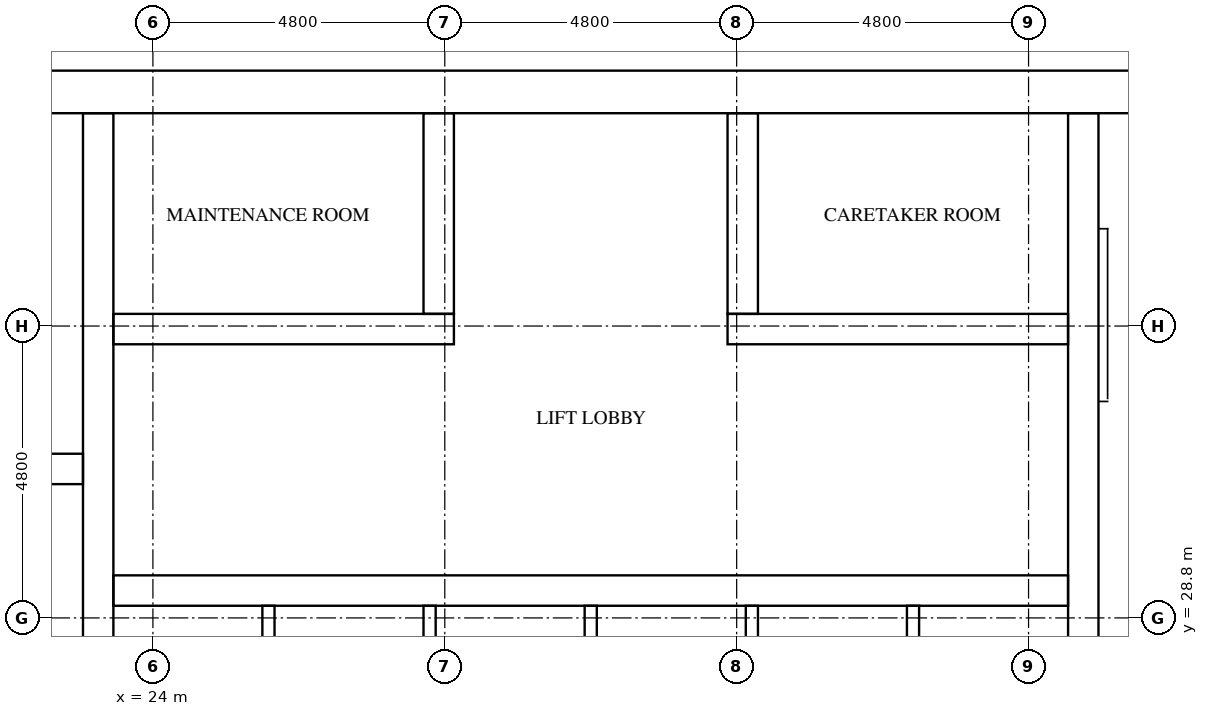
"""IFC4 building model, lengths in metres.
Left out: names, types, materials, properties, quantities, classifications, styles, units other than length and angle.
Written with IfcOpenShell. Run it as: python <this file> out.ifc"""

import sys

from ifc_helpers import new_model, si_unit, direction, frame, frame_2d, origin, place, context, subcontext, project, spatial, rectangle, extrude, element, fill, save


model = new_model("IFC4")
c1 = context("Model", 3, precision=1e-05, world=origin(), true_north=direction((0.0, 1.0)))
c2 = subcontext(c1, "Body", "Model", "MODEL_VIEW")
j1 = project(units=[si_unit("LENGTHUNIT", "METRE"), si_unit("PLANEANGLEUNIT", "RADIAN")], contexts=[c1])
p1 = place(None, origin())
s1 = spatial("IfcSite", under=j1, at=p1, CompositionType="ELEMENT")
p2 = place(p1, origin())
s2 = spatial("IfcBuilding", under=s1, at=p2, CompositionType="ELEMENT")
p3 = place(p2, frame((0.0, 0.0, 208.8)))
s3 = spatial("IfcBuildingStorey", under=s2, at=p3, CompositionType="ELEMENT", Elevation=208.8)
p4 = place(p3, frame((15.0, 37.45, 0.0), z_axis=(0.0, 0.0, 1.0), x_axis=(1.0, 0.0, 0.0)))
e1 = element("IfcWall", 1, at=p4, inside=s3, PredefinedType="SHEAR", context=c2, shape_type="SweptSolid", body=[
    extrude(rectangle(XDim=32.4, YDim=0.7, at=frame_2d((16.2, 0.0))), origin(), (0.0, 0.0, 1.0), 3.2),
])
p5 = place(p4, frame((15.3, 0.0, 0.0)))
e2 = element("IfcOpeningElement", 2, at=p5, cuts=e1, PredefinedType="OPENING", context=c2, shape_type="SweptSolid", body=[
    extrude(rectangle(XDim=1.8, YDim=2.1, at=frame_2d((0.9, 1.05))), frame((0.0, 0.36, 0.0), z_axis=(0.0, -1.0, 0.0), x_axis=(1.0, 0.0, 0.0)), (0.0, 0.0, 1.0), 0.72),
])
p6 = place(p4, frame((1.544, 0.0, 0.0)))
e3 = element("IfcOpeningElement", 3, at=p6, cuts=e1, PredefinedType="OPENING", context=c2, shape_type="SweptSolid", body=[
    extrude(rectangle(XDim=1.0, YDim=2.1, at=frame_2d((0.5, 1.05))), frame((0.0, 0.36, 0.0), z_axis=(0.0, -1.0, 0.0), x_axis=(1.0, 0.0, 0.0)), (0.0, 0.0, 1.0), 0.72),
])
p7 = place(p4, frame((5.219, 0.0, 0.0)))
e4 = element("IfcOpeningElement", 4, at=p7, cuts=e1, PredefinedType="OPENING", context=c2, shape_type="SweptSolid", body=[
    extrude(rectangle(XDim=1.0, YDim=2.1, at=frame_2d((0.5, 1.05))), frame((0.0, 0.36, 0.0), z_axis=(0.0, -1.0, 0.0), x_axis=(1.0, 0.0, 0.0)), (0.0, 0.0, 1.0), 0.72),
])
p8 = place(p3, frame((23.1, 15.7, 0.0), z_axis=(0.0, 0.0, 1.0), x_axis=(0.0, 1.0, 0.0)))
e5 = element("IfcWall", 5, at=p8, inside=s3, PredefinedType="SHEAR", context=c2, shape_type="SweptSolid", body=[
    extrude(rectangle(XDim=21.4, YDim=0.5, at=frame_2d((10.7, 0.0))), origin(), (0.0, 0.0, 1.0), 3.2),
])
p9 = place(p3, frame((39.3, 27.75, 0.0), z_axis=(0.0, 0.0, 1.0), x_axis=(0.0, 1.0, 0.0)))
e6 = element("IfcWall", 6, at=p9, inside=s3, PredefinedType="SHEAR", context=c2, shape_type="SweptSolid", body=[
    extrude(rectangle(XDim=9.35, YDim=0.5, at=frame_2d((4.675, 0.0))), origin(), (0.0, 0.0, 1.0), 3.2),
])
p10 = place(p3, frame((15.7, 31.25, 0.0), z_axis=(0.0, 0.0, 1.0), x_axis=(1.0, 0.0, 0.0)))
e7 = element("IfcWall", 7, at=p10, inside=s3, PredefinedType="SHEAR", context=c2, shape_type="SweptSolid", body=[
    extrude(rectangle(XDim=7.15, YDim=0.5, at=frame_2d((3.575, 0.0))), origin(), (0.0, 0.0, 1.0), 3.2),
])
p11 = place(p3, frame((23.35, 29.25, 0.0), z_axis=(0.0, 0.0, 1.0), x_axis=(1.0, 0.0, 0.0)))
e8 = element("IfcWall", 8, at=p11, inside=s3, PredefinedType="SHEAR", context=c2, shape_type="SweptSolid", body=[
    extrude(rectangle(XDim=15.7, YDim=0.5, at=frame_2d((7.85, 0.0))), origin(), (0.0, 0.0, 1.0), 3.2),
])
p12 = place(p11, frame((0.675, 0.0, 0.0)))
e9 = element("IfcOpeningElement", 9, at=p12, cuts=e8, PredefinedType="OPENING", context=c2, shape_type="SweptSolid", body=[
    extrude(rectangle(XDim=1.1, YDim=2.1, at=frame_2d((0.55, 1.05))), frame((0.0, 0.26, 0.0), z_axis=(0.0, -1.0, 0.0), x_axis=(1.0, 0.0, 0.0)), (0.0, 0.0, 1.0), 0.52),
])
p13 = place(p11, frame((3.325, 0.0, 0.0)))
e10 = element("IfcOpeningElement", 10, at=p13, cuts=e8, PredefinedType="OPENING", context=c2, shape_type="SweptSolid", body=[
    extrude(rectangle(XDim=1.1, YDim=2.1, at=frame_2d((0.55, 1.05))), frame((0.0, 0.26, 0.0), z_axis=(0.0, -1.0, 0.0), x_axis=(1.0, 0.0, 0.0)), (0.0, 0.0, 1.0), 0.52),
])
p14 = place(p11, frame((5.975, 0.0, 0.0)))
e11 = element("IfcOpeningElement", 11, at=p14, cuts=e8, PredefinedType="OPENING", context=c2, shape_type="SweptSolid", body=[
    extrude(rectangle(XDim=1.1, YDim=2.1, at=frame_2d((0.55, 1.05))), frame((0.0, 0.26, 0.0), z_axis=(0.0, -1.0, 0.0), x_axis=(1.0, 0.0, 0.0)), (0.0, 0.0, 1.0), 0.52),
])
p15 = place(p11, frame((8.625, 0.0, 0.0)))
e12 = element("IfcOpeningElement", 12, at=p15, cuts=e8, PredefinedType="OPENING", context=c2, shape_type="SweptSolid", body=[
    extrude(rectangle(XDim=1.1, YDim=2.1, at=frame_2d((0.55, 1.05))), frame((0.0, 0.26, 0.0), z_axis=(0.0, -1.0, 0.0), x_axis=(1.0, 0.0, 0.0)), (0.0, 0.0, 1.0), 0.52),
])
p16 = place(p11, frame((11.275, 0.0, 0.0)))
e13 = element("IfcOpeningElement", 13, at=p16, cuts=e8, PredefinedType="OPENING", context=c2, shape_type="SweptSolid", body=[
    extrude(rectangle(XDim=1.1, YDim=2.1, at=frame_2d((0.55, 1.05))), frame((0.0, 0.26, 0.0), z_axis=(0.0, -1.0, 0.0), x_axis=(1.0, 0.0, 0.0)), (0.0, 0.0, 1.0), 0.52),
])
p17 = place(p11, frame((13.925, 0.0, 0.0)))
e14 = element("IfcOpeningElement", 14, at=p17, cuts=e8, PredefinedType="OPENING", context=c2, shape_type="SweptSolid", body=[
    extrude(rectangle(XDim=1.1, YDim=2.1, at=frame_2d((0.55, 1.05))), frame((0.0, 0.26, 0.0), z_axis=(0.0, -1.0, 0.0), x_axis=(1.0, 0.0, 0.0)), (0.0, 0.0, 1.0), 0.52),
])
p18 = place(p3, frame((23.35, 33.55, 0.0), z_axis=(0.0, 0.0, 1.0), x_axis=(1.0, 0.0, 0.0)))
e15 = element("IfcWall", 15, at=p18, inside=s3, PredefinedType="SHEAR", context=c2, shape_type="SweptSolid", body=[
    extrude(rectangle(XDim=5.6, YDim=0.5, at=frame_2d((2.8, 0.0))), origin(), (0.0, 0.0, 1.0), 3.2),
])
p19 = place(p18, frame((2.05, 0.0, 0.0)))
e16 = element("IfcOpeningElement", 16, at=p19, cuts=e15, PredefinedType="OPENING", context=c2, shape_type="SweptSolid", body=[
    extrude(rectangle(XDim=1.0, YDim=2.1, at=frame_2d((0.5, 1.05))), frame((0.0, 0.26, 0.0), z_axis=(0.0, -1.0, 0.0), x_axis=(1.0, 0.0, 0.0)), (0.0, 0.0, 1.0), 0.52),
])
p20 = place(p3, frame((33.45, 33.55, 0.0), z_axis=(0.0, 0.0, 1.0), x_axis=(1.0, 0.0, 0.0)))
e17 = element("IfcWall", 17, at=p20, inside=s3, PredefinedType="SHEAR", context=c2, shape_type="SweptSolid", body=[
    extrude(rectangle(XDim=5.6, YDim=0.5, at=frame_2d((2.8, 0.0))), origin(), (0.0, 0.0, 1.0), 3.2),
])
p21 = place(p20, frame((2.55, 0.0, 0.0)))
e18 = element("IfcOpeningElement", 18, at=p21, cuts=e17, PredefinedType="OPENING", context=c2, shape_type="SweptSolid", body=[
    extrude(rectangle(XDim=1.0, YDim=2.1, at=frame_2d((0.5, 1.05))), frame((0.0, 0.26, 0.0), z_axis=(0.0, -1.0, 0.0), x_axis=(1.0, 0.0, 0.0)), (0.0, 0.0, 1.0), 0.52),
])
for number, where, z_axis, x_axis in (
    (19, (28.7, 33.8, 0.0), (0.0, 0.0, 1.0), (0.0, 1.0, 0.0)),
    (20, (33.7, 33.8, 0.0), (0.0, 0.0, 1.0), (0.0, 1.0, 0.0)),
):
    element("IfcWall", number, at=place(p3, frame(where, z_axis=z_axis, x_axis=x_axis)), inside=s3, PredefinedType="SHEAR", context=c2, shape_type="SweptSolid", body=[
        extrude(rectangle(XDim=3.3, YDim=0.5, at=frame_2d((1.65, 0.0))), origin(), (0.0, 0.0, 1.0), 3.2),
    ])
for number, where, z_axis, x_axis in (
    (21, (25.9, 26.4, 0.0), (0.0, 0.0, 1.0), (0.0, 1.0, 0.0)),
    (22, (28.55, 26.4, 0.0), (0.0, 0.0, 1.0), (0.0, 1.0, 0.0)),
    (23, (31.2, 26.4, 0.0), (0.0, 0.0, 1.0), (0.0, 1.0, 0.0)),
    (24, (33.85, 26.4, 0.0), (0.0, 0.0, 1.0), (0.0, 1.0, 0.0)),
    (25, (36.5, 26.4, 0.0), (0.0, 0.0, 1.0), (0.0, 1.0, 0.0)),
):
    element("IfcWall", number, at=place(p3, frame(where, z_axis=z_axis, x_axis=x_axis)), inside=s3, PredefinedType="SOLIDWALL", context=c2, shape_type="SweptSolid", body=[
        extrude(rectangle(XDim=2.6, YDim=0.2, at=frame_2d((1.3, 0.0))), origin(), (0.0, 0.0, 1.0), 3.2),
    ])
p22 = place(p12, origin())
e26 = element("IfcDoor", 26, at=p22, inside=s3, OperationType="DOUBLE_DOOR_SLIDING", PredefinedType="DOOR", context=c2, shape_type="SweptSolid", body=[
    extrude(rectangle(XDim=1.1, YDim=2.1, at=frame_2d((0.55, 1.05))), frame((0.0, 0.025, 0.0), z_axis=(0.0, -1.0, 0.0), x_axis=(1.0, 0.0, 0.0)), (0.0, 0.0, 1.0), 0.05),
])
fill(e9, e26)
p23 = place(p13, origin())
e27 = element("IfcDoor", 27, at=p23, inside=s3, OperationType="DOUBLE_DOOR_SLIDING", PredefinedType="DOOR", context=c2, shape_type="SweptSolid", body=[
    extrude(rectangle(XDim=1.1, YDim=2.1, at=frame_2d((0.55, 1.05))), frame((0.0, 0.025, 0.0), z_axis=(0.0, -1.0, 0.0), x_axis=(1.0, 0.0, 0.0)), (0.0, 0.0, 1.0), 0.05),
])
fill(e10, e27)
p24 = place(p14, origin())
e28 = element("IfcDoor", 28, at=p24, inside=s3, OperationType="DOUBLE_DOOR_SLIDING", PredefinedType="DOOR", context=c2, shape_type="SweptSolid", body=[
    extrude(rectangle(XDim=1.1, YDim=2.1, at=frame_2d((0.55, 1.05))), frame((0.0, 0.025, 0.0), z_axis=(0.0, -1.0, 0.0), x_axis=(1.0, 0.0, 0.0)), (0.0, 0.0, 1.0), 0.05),
])
fill(e11, e28)
p25 = place(p15, origin())
e29 = element("IfcDoor", 29, at=p25, inside=s3, OperationType="DOUBLE_DOOR_SLIDING", PredefinedType="DOOR", context=c2, shape_type="SweptSolid", body=[
    extrude(rectangle(XDim=1.1, YDim=2.1, at=frame_2d((0.55, 1.05))), frame((0.0, 0.025, 0.0), z_axis=(0.0, -1.0, 0.0), x_axis=(1.0, 0.0, 0.0)), (0.0, 0.0, 1.0), 0.05),
])
fill(e12, e29)
p26 = place(p16, origin())
e30 = element("IfcDoor", 30, at=p26, inside=s3, OperationType="DOUBLE_DOOR_SLIDING", PredefinedType="DOOR", context=c2, shape_type="SweptSolid", body=[
    extrude(rectangle(XDim=1.1, YDim=2.1, at=frame_2d((0.55, 1.05))), frame((0.0, 0.025, 0.0), z_axis=(0.0, -1.0, 0.0), x_axis=(1.0, 0.0, 0.0)), (0.0, 0.0, 1.0), 0.05),
])
fill(e13, e30)
p27 = place(p17, origin())
e31 = element("IfcDoor", 31, at=p27, inside=s3, OperationType="DOUBLE_DOOR_SLIDING", PredefinedType="DOOR", context=c2, shape_type="SweptSolid", body=[
    extrude(rectangle(XDim=1.1, YDim=2.1, at=frame_2d((0.55, 1.05))), frame((0.0, 0.025, 0.0), z_axis=(0.0, -1.0, 0.0), x_axis=(1.0, 0.0, 0.0)), (0.0, 0.0, 1.0), 0.05),
])
fill(e14, e31)
p28 = place(p5, origin())
e32 = element("IfcDoor", 32, at=p28, inside=s3, OperationType="DOUBLE_DOOR_SINGLE_SWING", PredefinedType="DOOR", context=c2, shape_type="SweptSolid", body=[
    extrude(rectangle(XDim=1.8, YDim=2.1, at=frame_2d((0.9, 1.05))), frame((0.0, 0.025, 0.0), z_axis=(0.0, -1.0, 0.0), x_axis=(1.0, 0.0, 0.0)), (0.0, 0.0, 1.0), 0.05),
])
fill(e2, e32)
p29 = place(p19, frame((1.0, 0.0, 0.0), z_axis=(0.0, 0.0, 1.0), x_axis=(-1.0, 0.0, 0.0)))
e33 = element("IfcDoor", 33, at=p29, inside=s3, OperationType="SINGLE_SWING_LEFT", PredefinedType="DOOR", context=c2, shape_type="SweptSolid", body=[
    extrude(rectangle(XDim=1.0, YDim=2.1, at=frame_2d((0.5, 1.05))), frame((0.0, 0.025, 0.0), z_axis=(0.0, -1.0, 0.0), x_axis=(1.0, 0.0, 0.0)), (0.0, 0.0, 1.0), 0.05),
])
fill(e16, e33)
p30 = place(p21, frame((1.0, 0.0, 0.0), z_axis=(0.0, 0.0, 1.0), x_axis=(-1.0, 0.0, 0.0)))
e34 = element("IfcDoor", 34, at=p30, inside=s3, OperationType="SINGLE_SWING_RIGHT", PredefinedType="DOOR", context=c2, shape_type="SweptSolid", body=[
    extrude(rectangle(XDim=1.0, YDim=2.1, at=frame_2d((0.5, 1.05))), frame((0.0, 0.025, 0.0), z_axis=(0.0, -1.0, 0.0), x_axis=(1.0, 0.0, 0.0)), (0.0, 0.0, 1.0), 0.05),
])
fill(e18, e34)
save(model, sys.argv[1])
